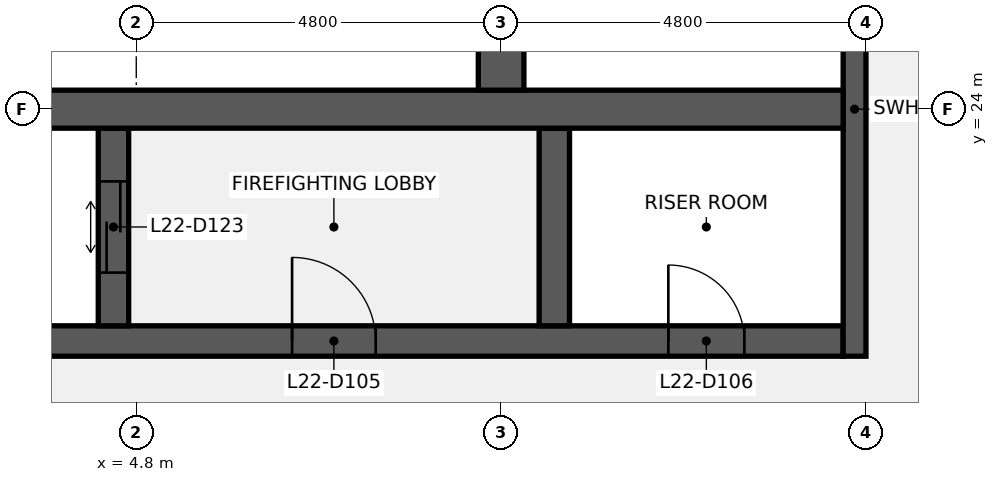
"""IFC4 building model, lengths in metres.
Left out: names, types, materials, properties, quantities, classifications, styles, units other than length and angle.
Written with IfcOpenShell. Run it as: python <this file> out.ifc"""

import sys

from ifc_helpers import new_model, si_unit, direction, frame, frame_2d, origin, place, context, subcontext, project, spatial, rectangle, extrude, element, fill, save


model = new_model("IFC4")
c1 = context("Model", 3, precision=1e-05, world=origin(), true_north=direction((0.0, 1.0)))
c2 = subcontext(c1, "Body", "Model", "MODEL_VIEW")
j1 = project(units=[si_unit("LENGTHUNIT", "METRE"), si_unit("PLANEANGLEUNIT", "RADIAN")], contexts=[c1])
p1 = place(None, origin())
s1 = spatial("IfcSite", under=j1, at=p1, CompositionType="ELEMENT")
p2 = place(p1, origin())
s2 = spatial("IfcBuilding", under=s1, at=p2, CompositionType="ELEMENT")
p3 = place(p2, frame((0.0, 0.0, 108.1)))
s3 = spatial("IfcBuildingStorey", under=s2, at=p3, CompositionType="ELEMENT", Elevation=108.1)
p4 = place(p3, frame((1.0, 20.95, 0.0), z_axis=(0.0, 0.0, 1.0), x_axis=(1.0, 0.0, 0.0)))
e1 = element("IfcWall", 1, at=p4, inside=s3, PredefinedType="SHEAR", context=c2, shape_type="SweptSolid", body=[
    extrude(rectangle(XDim=13.1, YDim=0.4, at=frame_2d((6.55, 0.0))), origin(), (0.0, 0.0, 1.0), 3.84),
])
p5 = place(p4, frame((5.85, 0.0, 0.0)))
e2 = element("IfcOpeningElement", 2, at=p5, cuts=e1, PredefinedType="OPENING", context=c2, shape_type="SweptSolid", body=[
    extrude(rectangle(XDim=1.1, YDim=2.1, at=frame_2d((0.55, 1.05))), frame((0.0, 0.21, 0.0), z_axis=(0.0, -1.0, 0.0), x_axis=(1.0, 0.0, 0.0)), (0.0, 0.0, 1.0), 0.42),
])
p6 = place(p4, frame((10.8, 0.0, 0.0)))
e3 = element("IfcOpeningElement", 3, at=p6, cuts=e1, PredefinedType="OPENING", context=c2, shape_type="SweptSolid", body=[
    extrude(rectangle(XDim=1.0, YDim=2.1, at=frame_2d((0.5, 1.05))), frame((0.0, 0.21, 0.0), z_axis=(0.0, -1.0, 0.0), x_axis=(1.0, 0.0, 0.0)), (0.0, 0.0, 1.0), 0.42),
])
p7 = place(p3, frame((14.25, 20.75, 0.0), z_axis=(0.0, 0.0, 1.0), x_axis=(0.0, 1.0, 0.0)))
e4 = element("IfcWall", 4, at=p7, inside=s3, PredefinedType="SHEAR", context=c2, shape_type="SweptSolid", body=[
    extrude(rectangle(XDim=6.5, YDim=0.3, at=frame_2d((3.25, 0.0))), origin(), (0.0, 0.0, 1.0), 3.84),
])
p8 = place(p3, frame((4.5, 21.15, 0.0), z_axis=(0.0, 0.0, 1.0), x_axis=(0.0, 1.0, 0.0)))
e5 = element("IfcWall", 5, at=p8, inside=s3, PredefinedType="SHEAR", context=c2, shape_type="SweptSolid", body=[
    extrude(rectangle(XDim=2.6, YDim=0.4, at=frame_2d((1.3, 0.0))), origin(), (0.0, 0.0, 1.0), 3.84),
])
p9 = place(p8, frame((0.7, 0.0, 0.0)))
e6 = element("IfcOpeningElement", 6, at=p9, cuts=e5, PredefinedType="OPENING", context=c2, shape_type="SweptSolid", body=[
    extrude(rectangle(XDim=1.2, YDim=2.1, at=frame_2d((0.6, 1.05))), frame((0.0, 0.21, 0.0), z_axis=(0.0, -1.0, 0.0), x_axis=(1.0, 0.0, 0.0)), (0.0, 0.0, 1.0), 0.42),
])
p10 = place(p3, frame((10.3, 21.15, 0.0), z_axis=(0.0, 0.0, 1.0), x_axis=(0.0, 1.0, 0.0)))
e7 = element("IfcWall", 7, at=p10, inside=s3, PredefinedType="SHEAR", context=c2, shape_type="SweptSolid", body=[
    extrude(rectangle(XDim=2.6, YDim=0.4, at=frame_2d((1.3, 0.0))), origin(), (0.0, 0.0, 1.0), 3.84),
])
p11 = place(p3, frame((1.0, 24.0, 0.0), z_axis=(0.0, 0.0, 1.0), x_axis=(1.0, 0.0, 0.0)))
e8 = element("IfcWall", 8, at=p11, inside=s3, PredefinedType="SHEAR", context=c2, shape_type="SweptSolid", body=[
    extrude(rectangle(XDim=13.1, YDim=0.5, at=frame_2d((6.55, 0.0))), origin(), (0.0, 0.0, 1.0), 3.84),
])
p12 = place(p3, frame((9.6, 24.25, 0.0), z_axis=(0.0, 0.0, 1.0), x_axis=(0.0, 1.0, 0.0)))
e9 = element("IfcWall", 9, at=p12, inside=s3, PredefinedType="SHEAR", context=c2, shape_type="SweptSolid", body=[
    extrude(rectangle(XDim=2.6, YDim=0.6, at=frame_2d((1.3, 0.0))), origin(), (0.0, 0.0, 1.0), 3.84),
])
p13 = place(p5, origin())
e10 = element("IfcDoor", 10, at=p13, inside=s3, OperationType="SINGLE_SWING_LEFT", PredefinedType="DOOR", context=c2, shape_type="SweptSolid", body=[
    extrude(rectangle(XDim=1.1, YDim=2.1, at=frame_2d((0.55, 1.05))), frame((0.0, 0.025, 0.0), z_axis=(0.0, -1.0, 0.0), x_axis=(1.0, 0.0, 0.0)), (0.0, 0.0, 1.0), 0.05),
])
fill(e2, e10)
p14 = place(p6, origin())
e11 = element("IfcDoor", 11, at=p14, inside=s3, OperationType="SINGLE_SWING_LEFT", PredefinedType="DOOR", context=c2, shape_type="SweptSolid", body=[
    extrude(rectangle(XDim=1.0, YDim=2.1, at=frame_2d((0.5, 1.05))), frame((0.0, 0.025, 0.0), z_axis=(0.0, -1.0, 0.0), x_axis=(1.0, 0.0, 0.0)), (0.0, 0.0, 1.0), 0.05),
])
fill(e3, e11)
p15 = place(p9, origin())
e12 = element("IfcDoor", 12, at=p15, inside=s3, OperationType="DOUBLE_DOOR_SLIDING", PredefinedType="DOOR", context=c2, shape_type="SweptSolid", body=[
    extrude(rectangle(XDim=1.2, YDim=2.1, at=frame_2d((0.6, 1.05))), frame((0.0, 0.025, 0.0), z_axis=(0.0, -1.0, 0.0), x_axis=(1.0, 0.0, 0.0)), (0.0, 0.0, 1.0), 0.05),
])
fill(e6, e12)
save(model, sys.argv[1])
